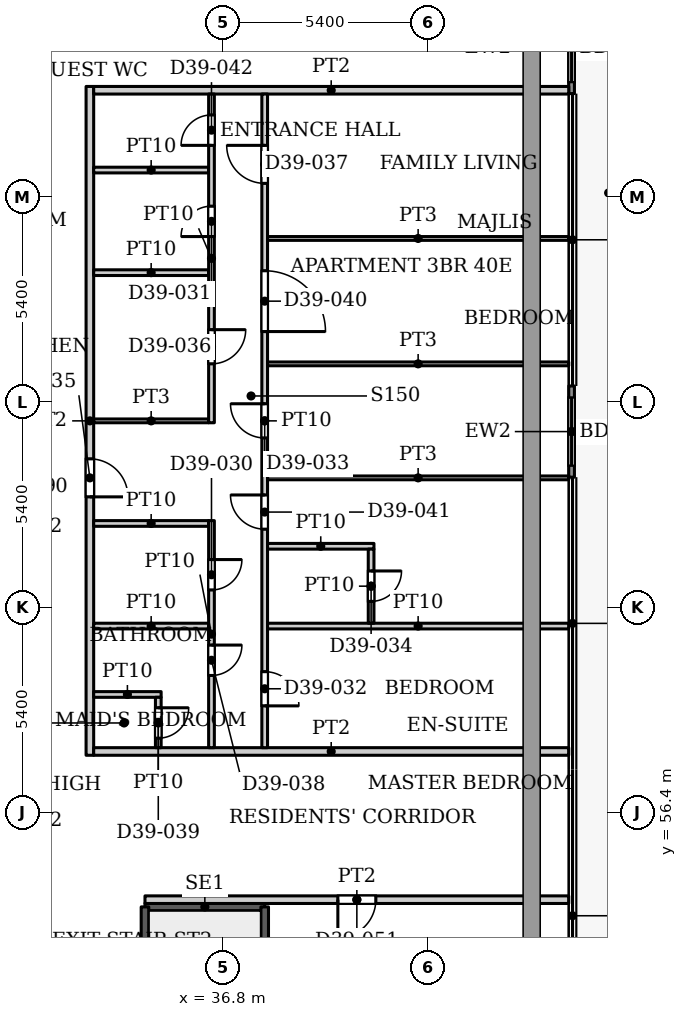
"""IFC4 building model, lengths in metres.
Left out: names, types, materials, properties, quantities, classifications, styles, units other than length and angle.
Written with IfcOpenShell. Run it as: python <this file> out.ifc"""

import sys

from ifc_helpers import new_model, si_unit, direction, frame, frame_2d, origin, place, context, subcontext, project, spatial, rectangle, extrude, source, transform, mapped, element, fill, save


model = new_model("IFC4")
c1 = context("Model", 3, precision=1e-05, world=origin(), true_north=direction((0.0, 1.0)))
c2 = subcontext(c1, "Body", "Model", "MODEL_VIEW")
j1 = project(units=[si_unit("LENGTHUNIT", "METRE"), si_unit("PLANEANGLEUNIT", "RADIAN")], contexts=[c1])
p1 = place(None, origin())
s1 = spatial("IfcSite", under=j1, at=p1, CompositionType="ELEMENT")
p2 = place(p1, origin())
s2 = spatial("IfcBuilding", under=s1, at=p2, CompositionType="ELEMENT")
p3 = place(p2, frame((0.0, 0.0, 172.1)))
s3 = spatial("IfcBuildingStorey", under=s2, at=p3, CompositionType="ELEMENT", Elevation=172.1)
p4 = place(p3, frame((45.975, 77.712, 0.0), z_axis=(0.0, 0.0, 1.0), x_axis=(0.0, -1.0, 0.0)))
e1 = element("IfcWall", 1, at=p4, inside=s3, PredefinedType="SOLIDWALL", context=c2, shape_type="SweptSolid", body=[
    extrude(rectangle(XDim=2.4, YDim=0.15, at=frame_2d((1.2, 0.0))), origin(), (0.0, 0.0, 1.0), 3.75),
])
p5 = place(p4, frame((0.3, 0.0, 0.0)))
e2 = element("IfcOpeningElement", 2, at=p5, cuts=e1, PredefinedType="OPENING", context=c2, shape_type="SweptSolid", body=[
    extrude(rectangle(XDim=1.8, YDim=2.4, at=frame_2d((0.9, 1.2))), frame((0.0, 0.085, 0.0), z_axis=(0.0, -1.0, 0.0), x_axis=(1.0, 0.0, 0.0)), (0.0, 0.0, 1.0), 0.17),
])
p6 = place(p3, frame((45.975, 67.618, 0.0), z_axis=(0.0, 0.0, 1.0), x_axis=(0.0, -1.0, 0.0)))
e3 = element("IfcWall", 3, at=p6, inside=s3, PredefinedType="SOLIDWALL", context=c2, shape_type="SweptSolid", body=[
    extrude(rectangle(XDim=2.4, YDim=0.15, at=frame_2d((1.2, 0.0))), origin(), (0.0, 0.0, 1.0), 3.75),
])
p7 = place(p6, frame((0.3, 0.0, 0.0)))
e4 = element("IfcOpeningElement", 4, at=p7, cuts=e3, PredefinedType="OPENING", context=c2, shape_type="SweptSolid", body=[
    extrude(rectangle(XDim=1.8, YDim=2.4, at=frame_2d((0.9, 1.2))), frame((0.0, 0.085, 0.0), z_axis=(0.0, -1.0, 0.0), x_axis=(1.0, 0.0, 0.0)), (0.0, 0.0, 1.0), 0.17),
])
p8 = place(p3, frame((34.75, 53.91, 0.0), z_axis=(0.0, 0.0, 1.0), x_axis=(1.0, 0.0, 0.0)))
e5 = element("IfcWall", 5, at=p8, inside=s3, PredefinedType="SHEAR", context=c2, shape_type="SweptSolid", body=[
    extrude(rectangle(XDim=3.15, YDim=0.2, at=frame_2d((1.575, 0.0))), origin(), (0.0, 0.0, 1.0), 3.9),
])
p9 = place(p3, frame((34.75, 47.5, 0.0), z_axis=(0.0, 0.0, 1.0), x_axis=(0.0, 1.0, 0.0)))
e6 = element("IfcWall", 6, at=p9, inside=s3, PredefinedType="SHEAR", context=c2, shape_type="SweptSolid", body=[
    extrude(rectangle(XDim=6.41, YDim=0.2, at=frame_2d((3.205, 0.0))), origin(), (0.0, 0.0, 1.0), 3.9),
])
p10 = place(p3, frame((37.9, 44.75, 0.0), z_axis=(0.0, 0.0, 1.0), x_axis=(0.0, 1.0, 0.0)))
e7 = element("IfcWall", 7, at=p10, inside=s3, PredefinedType="SHEAR", context=c2, shape_type="SweptSolid", body=[
    extrude(rectangle(XDim=9.16, YDim=0.2, at=frame_2d((4.58, 0.0))), origin(), (0.0, 0.0, 1.0), 3.9),
])
p11 = place(p3, frame((33.3, 57.9, 0.0), z_axis=(0.0, 0.0, 1.0), x_axis=(0.0, 1.0, 0.0)))
e8 = element("IfcWall", 8, at=p11, inside=s3, PredefinedType="PARTITIONING", context=c2, shape_type="SweptSolid", body=[
    extrude(rectangle(XDim=17.6, YDim=0.2, at=frame_2d((8.8, 0.0))), origin(), (0.0, 0.0, 1.0), 3.6),
])
p12 = place(p11, frame((6.8, 0.0, 0.0)))
e9 = element("IfcOpeningElement", 9, at=p12, cuts=e8, PredefinedType="OPENING", context=c2, shape_type="SweptSolid", body=[
    extrude(rectangle(XDim=1.0, YDim=2.1, at=frame_2d((0.5, 1.05))), frame((0.0, 0.11, 0.0), z_axis=(0.0, -1.0, 0.0), x_axis=(1.0, 0.0, 0.0)), (0.0, 0.0, 1.0), 0.22),
])
p13 = place(p3, frame((33.4, 58.0, 0.0), z_axis=(0.0, 0.0, 1.0), x_axis=(1.0, 0.0, 0.0)))
e10 = element("IfcWall", 10, at=p13, inside=s3, PredefinedType="PARTITIONING", context=c2, shape_type="SweptSolid", body=[
    extrude(rectangle(XDim=12.5, YDim=0.2, at=frame_2d((6.25, 0.0))), origin(), (0.0, 0.0, 1.0), 3.6),
])
p14 = place(p3, frame((33.4, 59.5, 0.0), z_axis=(0.0, 0.0, 1.0), x_axis=(1.0, 0.0, 0.0)))
e11 = element("IfcWall", 11, at=p14, inside=s3, PredefinedType="PARTITIONING", context=c2, shape_type="SweptSolid", body=[
    extrude(rectangle(XDim=1.775, YDim=0.15, at=frame_2d((0.888, 0.0))), origin(), (0.0, 0.0, 1.0), 3.6),
])
for number, where, z_axis, x_axis in (
    (12, (33.4, 61.3, 0.0), (0.0, 0.0, 1.0), (1.0, 0.0, 0.0)),
    (13, (33.4, 64.0, 0.0), (0.0, 0.0, 1.0), (1.0, 0.0, 0.0)),
):
    element("IfcWall", number, at=place(p3, frame(where, z_axis=z_axis, x_axis=x_axis)), inside=s3, PredefinedType="PARTITIONING", context=c2, shape_type="SweptSolid", body=[
        extrude(rectangle(XDim=3.025, YDim=0.15, at=frame_2d((1.513, 0.0))), origin(), (0.0, 0.0, 1.0), 3.6),
    ])
p15 = place(p3, frame((33.4, 66.7, 0.0), z_axis=(0.0, 0.0, 1.0), x_axis=(1.0, 0.0, 0.0)))
e14 = element("IfcWall", 14, at=p15, inside=s3, PredefinedType="PARTITIONING", context=c2, shape_type="SweptSolid", body=[
    extrude(rectangle(XDim=3.025, YDim=0.1, at=frame_2d((1.513, 0.0))), origin(), (0.0, 0.0, 1.0), 3.6),
])
for number, where, z_axis, x_axis in (
    (15, (33.4, 70.6, 0.0), (0.0, 0.0, 1.0), (1.0, 0.0, 0.0)),
    (16, (33.4, 73.3, 0.0), (0.0, 0.0, 1.0), (1.0, 0.0, 0.0)),
):
    element("IfcWall", number, at=place(p3, frame(where, z_axis=z_axis, x_axis=x_axis)), inside=s3, PredefinedType="PARTITIONING", context=c2, shape_type="SweptSolid", body=[
        extrude(rectangle(XDim=3.025, YDim=0.15, at=frame_2d((1.513, 0.0))), origin(), (0.0, 0.0, 1.0), 3.6),
    ])
p16 = place(p3, frame((33.4, 75.4, 0.0), z_axis=(0.0, 0.0, 1.0), x_axis=(1.0, 0.0, 0.0)))
e17 = element("IfcWall", 17, at=p16, inside=s3, PredefinedType="PARTITIONING", context=c2, shape_type="SweptSolid", body=[
    extrude(rectangle(XDim=12.5, YDim=0.2, at=frame_2d((6.25, 0.0))), origin(), (0.0, 0.0, 1.0), 3.6),
])
p17 = place(p3, frame((34.75, 54.1, 0.0), z_axis=(0.0, 0.0, 1.0), x_axis=(1.0, 0.0, 0.0)))
e18 = element("IfcWall", 18, at=p17, inside=s3, PredefinedType="PARTITIONING", context=c2, shape_type="SweptSolid", body=[
    extrude(rectangle(XDim=11.15, YDim=0.2, at=frame_2d((5.575, 0.0))), origin(), (0.0, 0.0, 1.0), 3.6),
])
p18 = place(p17, frame((5.075, 0.0, 0.0)))
e19 = element("IfcOpeningElement", 19, at=p18, cuts=e18, PredefinedType="OPENING", context=c2, shape_type="SweptSolid", body=[
    extrude(rectangle(XDim=1.0, YDim=2.1, at=frame_2d((0.5, 1.05))), frame((0.0, 0.11, 0.0), z_axis=(0.0, -1.0, 0.0), x_axis=(1.0, 0.0, 0.0)), (0.0, 0.0, 1.0), 0.22),
])
p19 = place(p3, frame((35.1, 58.1, 0.0), z_axis=(0.0, 0.0, 1.0), x_axis=(0.0, 1.0, 0.0)))
e20 = element("IfcWall", 20, at=p19, inside=s3, PredefinedType="PARTITIONING", context=c2, shape_type="SweptSolid", body=[
    extrude(rectangle(XDim=1.325, YDim=0.15, at=frame_2d((0.663, 0.0))), origin(), (0.0, 0.0, 1.0), 3.6),
])
p20 = place(p19, frame((0.25, 0.0, 0.0)))
e21 = element("IfcOpeningElement", 21, at=p20, cuts=e20, PredefinedType="OPENING", context=c2, shape_type="SweptSolid", body=[
    extrude(rectangle(XDim=0.8, YDim=2.1, at=frame_2d((0.4, 1.05))), frame((0.0, 0.085, 0.0), z_axis=(0.0, -1.0, 0.0), x_axis=(1.0, 0.0, 0.0)), (0.0, 0.0, 1.0), 0.17),
])
p21 = place(p3, frame((36.5, 58.1, 0.0), z_axis=(0.0, 0.0, 1.0), x_axis=(0.0, 1.0, 0.0)))
e22 = element("IfcWall", 22, at=p21, inside=s3, PredefinedType="PARTITIONING", context=c2, shape_type="SweptSolid", body=[
    extrude(rectangle(XDim=5.975, YDim=0.15, at=frame_2d((2.987, 0.0))), origin(), (0.0, 0.0, 1.0), 3.6),
])
p22 = place(p21, frame((4.15, 0.0, 0.0)))
e23 = element("IfcOpeningElement", 23, at=p22, cuts=e22, PredefinedType="OPENING", context=c2, shape_type="SweptSolid", body=[
    extrude(rectangle(XDim=0.8, YDim=2.1, at=frame_2d((0.4, 1.05))), frame((0.0, 0.085, 0.0), z_axis=(0.0, -1.0, 0.0), x_axis=(1.0, 0.0, 0.0)), (0.0, 0.0, 1.0), 0.17),
])
p23 = place(p21, frame((1.9, 0.0, 0.0)))
e24 = element("IfcOpeningElement", 24, at=p23, cuts=e22, PredefinedType="OPENING", context=c2, shape_type="SweptSolid", body=[
    extrude(rectangle(XDim=0.8, YDim=2.1, at=frame_2d((0.4, 1.05))), frame((0.0, 0.085, 0.0), z_axis=(0.0, -1.0, 0.0), x_axis=(1.0, 0.0, 0.0)), (0.0, 0.0, 1.0), 0.17),
])
p24 = place(p3, frame((36.5, 66.65, 0.0), z_axis=(0.0, 0.0, 1.0), x_axis=(0.0, 1.0, 0.0)))
e25 = element("IfcWall", 25, at=p24, inside=s3, PredefinedType="PARTITIONING", context=c2, shape_type="SweptSolid", body=[
    extrude(rectangle(XDim=8.65, YDim=0.15, at=frame_2d((4.325, 0.0))), origin(), (0.0, 0.0, 1.0), 3.6),
])
p25 = place(p24, frame((4.9, 0.0, 0.0)))
e26 = element("IfcOpeningElement", 26, at=p25, cuts=e25, PredefinedType="OPENING", context=c2, shape_type="SweptSolid", body=[
    extrude(rectangle(XDim=0.8, YDim=2.1, at=frame_2d((0.4, 1.05))), frame((0.0, 0.085, 0.0), z_axis=(0.0, -1.0, 0.0), x_axis=(1.0, 0.0, 0.0)), (0.0, 0.0, 1.0), 0.17),
])
p26 = place(p24, frame((1.55, 0.0, 0.0)))
e27 = element("IfcOpeningElement", 27, at=p26, cuts=e25, PredefinedType="OPENING", context=c2, shape_type="SweptSolid", body=[
    extrude(rectangle(XDim=0.9, YDim=2.1, at=frame_2d((0.45, 1.05))), frame((0.0, 0.085, 0.0), z_axis=(0.0, -1.0, 0.0), x_axis=(1.0, 0.0, 0.0)), (0.0, 0.0, 1.0), 0.17),
])
p27 = place(p24, frame((7.3, 0.0, 0.0)))
e28 = element("IfcOpeningElement", 28, at=p27, cuts=e25, PredefinedType="OPENING", context=c2, shape_type="SweptSolid", body=[
    extrude(rectangle(XDim=0.8, YDim=2.1, at=frame_2d((0.4, 1.05))), frame((0.0, 0.085, 0.0), z_axis=(0.0, -1.0, 0.0), x_axis=(1.0, 0.0, 0.0)), (0.0, 0.0, 1.0), 0.17),
])
p28 = place(p3, frame((37.9, 58.1, 0.0), z_axis=(0.0, 0.0, 1.0), x_axis=(0.0, 1.0, 0.0)))
e29 = element("IfcWall", 29, at=p28, inside=s3, PredefinedType="PARTITIONING", context=c2, shape_type="SweptSolid", body=[
    extrude(rectangle(XDim=17.2, YDim=0.15, at=frame_2d((8.6, 0.0))), origin(), (0.0, 0.0, 1.0), 3.6),
])
p29 = place(p28, frame((1.1, 0.0, 0.0)))
e30 = element("IfcOpeningElement", 30, at=p29, cuts=e29, PredefinedType="OPENING", context=c2, shape_type="SweptSolid", body=[
    extrude(rectangle(XDim=0.9, YDim=2.1, at=frame_2d((0.45, 1.05))), frame((0.0, 0.085, 0.0), z_axis=(0.0, -1.0, 0.0), x_axis=(1.0, 0.0, 0.0)), (0.0, 0.0, 1.0), 0.17),
])
p30 = place(p28, frame((8.15, 0.0, 0.0)))
e31 = element("IfcOpeningElement", 31, at=p30, cuts=e29, PredefinedType="OPENING", context=c2, shape_type="SweptSolid", body=[
    extrude(rectangle(XDim=0.9, YDim=2.1, at=frame_2d((0.45, 1.05))), frame((0.0, 0.085, 0.0), z_axis=(0.0, -1.0, 0.0), x_axis=(1.0, 0.0, 0.0)), (0.0, 0.0, 1.0), 0.17),
])
p31 = place(p28, frame((14.85, 0.0, 0.0)))
e32 = element("IfcOpeningElement", 32, at=p31, cuts=e29, PredefinedType="OPENING", context=c2, shape_type="SweptSolid", body=[
    extrude(rectangle(XDim=1.0, YDim=2.1, at=frame_2d((0.5, 1.05))), frame((0.0, 0.085, 0.0), z_axis=(0.0, -1.0, 0.0), x_axis=(1.0, 0.0, 0.0)), (0.0, 0.0, 1.0), 0.17),
])
p32 = place(p28, frame((10.95, 0.0, 0.0)))
e33 = element("IfcOpeningElement", 33, at=p32, cuts=e29, PredefinedType="OPENING", context=c2, shape_type="SweptSolid", body=[
    extrude(rectangle(XDim=1.6, YDim=2.1, at=frame_2d((0.8, 1.05))), frame((0.0, 0.085, 0.0), z_axis=(0.0, -1.0, 0.0), x_axis=(1.0, 0.0, 0.0)), (0.0, 0.0, 1.0), 0.17),
])
p33 = place(p28, frame((5.75, 0.0, 0.0)))
e34 = element("IfcOpeningElement", 34, at=p33, cuts=e29, PredefinedType="OPENING", context=c2, shape_type="SweptSolid", body=[
    extrude(rectangle(XDim=0.9, YDim=2.1, at=frame_2d((0.45, 1.05))), frame((0.0, 0.085, 0.0), z_axis=(0.0, -1.0, 0.0), x_axis=(1.0, 0.0, 0.0)), (0.0, 0.0, 1.0), 0.17),
])
p34 = place(p3, frame((37.975, 61.3, 0.0), z_axis=(0.0, 0.0, 1.0), x_axis=(1.0, 0.0, 0.0)))
e35 = element("IfcWall", 35, at=p34, inside=s3, PredefinedType="PARTITIONING", context=c2, shape_type="SweptSolid", body=[
    extrude(rectangle(XDim=7.925, YDim=0.15, at=frame_2d((3.962, 0.0))), origin(), (0.0, 0.0, 1.0), 3.6),
])
p35 = place(p3, frame((37.975, 63.4, 0.0), z_axis=(0.0, 0.0, 1.0), x_axis=(1.0, 0.0, 0.0)))
e36 = element("IfcWall", 36, at=p35, inside=s3, PredefinedType="PARTITIONING", context=c2, shape_type="SweptSolid", body=[
    extrude(rectangle(XDim=2.8, YDim=0.15, at=frame_2d((1.4, 0.0))), origin(), (0.0, 0.0, 1.0), 3.6),
])
for number, where, z_axis, x_axis in (
    (37, (37.975, 65.2, 0.0), (0.0, 0.0, 1.0), (1.0, 0.0, 0.0)),
    (38, (37.975, 68.2, 0.0), (0.0, 0.0, 1.0), (1.0, 0.0, 0.0)),
    (39, (37.975, 71.5, 0.0), (0.0, 0.0, 1.0), (1.0, 0.0, 0.0)),
):
    element("IfcWall", number, at=place(p3, frame(where, z_axis=z_axis, x_axis=x_axis)), inside=s3, PredefinedType="PARTITIONING", context=c2, shape_type="SweptSolid", body=[
        extrude(rectangle(XDim=7.925, YDim=0.1, at=frame_2d((3.962, 0.0))), origin(), (0.0, 0.0, 1.0), 3.6),
    ])
p36 = place(p3, frame((40.7, 61.375, 0.0), z_axis=(0.0, 0.0, 1.0), x_axis=(0.0, 1.0, 0.0)))
e40 = element("IfcWall", 40, at=p36, inside=s3, PredefinedType="PARTITIONING", context=c2, shape_type="SweptSolid", body=[
    extrude(rectangle(XDim=1.95, YDim=0.15, at=frame_2d((0.975, 0.0))), origin(), (0.0, 0.0, 1.0), 3.6),
])
p37 = place(p36, frame((0.575, 0.0, 0.0)))
e41 = element("IfcOpeningElement", 41, at=p37, cuts=e40, PredefinedType="OPENING", context=c2, shape_type="SweptSolid", body=[
    extrude(rectangle(XDim=0.8, YDim=2.1, at=frame_2d((0.4, 1.05))), frame((0.0, 0.085, 0.0), z_axis=(0.0, -1.0, 0.0), x_axis=(1.0, 0.0, 0.0)), (0.0, 0.0, 1.0), 0.17),
])
m1 = source(origin(), c2, "Body", "SweptSolid", [
    extrude(rectangle(XDim=1.8, YDim=2.4, at=frame_2d((0.9, 1.2))), frame((0.0, 0.025, 0.0), z_axis=(0.0, -1.0, 0.0), x_axis=(1.0, 0.0, 0.0)), (0.0, 0.0, 1.0), 0.05),
])
p38 = place(p5, origin())
e42 = element("IfcDoor", 42, at=p38, inside=s3, OperationType="SLIDING_TO_LEFT", PredefinedType="DOOR", context=c2, shape_type="MappedRepresentation", body=[
    mapped(m1, transform((0.0, 0.0, 0.0), x_axis=(1.0, 0.0, 0.0), y_axis=(0.0, 1.0, 0.0), z_axis=(0.0, 0.0, 1.0), scale=1.0)),
])
fill(e2, e42)
p39 = place(p7, origin())
e43 = element("IfcDoor", 43, at=p39, inside=s3, OperationType="SLIDING_TO_LEFT", PredefinedType="DOOR", context=c2, shape_type="MappedRepresentation", body=[
    mapped(m1, transform((0.0, 0.0, 0.0), x_axis=(1.0, 0.0, 0.0), y_axis=(0.0, 1.0, 0.0), z_axis=(0.0, 0.0, 1.0), scale=1.0)),
])
fill(e4, e43)
m2 = source(origin(), c2, "Body", "SweptSolid", [
    extrude(rectangle(XDim=0.8, YDim=2.1, at=frame_2d((0.4, 1.05))), frame((0.0, 0.025, 0.0), z_axis=(0.0, -1.0, 0.0), x_axis=(1.0, 0.0, 0.0)), (0.0, 0.0, 1.0), 0.05),
])
p40 = place(p22, origin())
e44 = element("IfcDoor", 44, at=p40, inside=s3, OperationType="SINGLE_SWING_RIGHT", PredefinedType="DOOR", context=c2, shape_type="MappedRepresentation", body=[
    mapped(m2, transform((0.0, 0.0, 0.0), x_axis=(1.0, 0.0, 0.0), y_axis=(0.0, 1.0, 0.0), z_axis=(0.0, 0.0, 1.0), scale=1.0)),
])
fill(e23, e44)
p41 = place(p25, origin())
e45 = element("IfcDoor", 45, at=p41, inside=s3, OperationType="SINGLE_SWING_LEFT", PredefinedType="DOOR", context=c2, shape_type="MappedRepresentation", body=[
    mapped(m2, transform((0.0, 0.0, 0.0), x_axis=(1.0, 0.0, 0.0), y_axis=(0.0, 1.0, 0.0), z_axis=(0.0, 0.0, 1.0), scale=1.0)),
])
fill(e26, e45)
m3 = source(origin(), c2, "Body", "SweptSolid", [
    extrude(rectangle(XDim=0.9, YDim=2.1, at=frame_2d((0.45, 1.05))), frame((0.0, 0.025, 0.0), z_axis=(0.0, -1.0, 0.0), x_axis=(1.0, 0.0, 0.0)), (0.0, 0.0, 1.0), 0.05),
])
p42 = place(p29, origin())
e46 = element("IfcDoor", 46, at=p42, inside=s3, OperationType="SINGLE_SWING_RIGHT", PredefinedType="DOOR", context=c2, shape_type="MappedRepresentation", body=[
    mapped(m3, transform((0.0, 0.0, 0.0), x_axis=(1.0, 0.0, 0.0), y_axis=(0.0, 1.0, 0.0), z_axis=(0.0, 0.0, 1.0), scale=1.0)),
])
fill(e30, e46)
p43 = place(p30, origin())
e47 = element("IfcDoor", 47, at=p43, inside=s3, OperationType="SINGLE_SWING_LEFT", PredefinedType="DOOR", context=c2, shape_type="MappedRepresentation", body=[
    mapped(m3, transform((0.0, 0.0, 0.0), x_axis=(1.0, 0.0, 0.0), y_axis=(0.0, 1.0, 0.0), z_axis=(0.0, 0.0, 1.0), scale=1.0)),
])
fill(e31, e47)
p44 = place(p37, origin())
e48 = element("IfcDoor", 48, at=p44, inside=s3, OperationType="SINGLE_SWING_RIGHT", PredefinedType="DOOR", context=c2, shape_type="MappedRepresentation", body=[
    mapped(m2, transform((0.0, 0.0, 0.0), x_axis=(1.0, 0.0, 0.0), y_axis=(0.0, 1.0, 0.0), z_axis=(0.0, 0.0, 1.0), scale=1.0)),
])
fill(e41, e48)
m4 = source(origin(), c2, "Body", "SweptSolid", [
    extrude(rectangle(XDim=1.0, YDim=2.1, at=frame_2d((0.5, 1.05))), frame((0.0, 0.025, 0.0), z_axis=(0.0, -1.0, 0.0), x_axis=(1.0, 0.0, 0.0)), (0.0, 0.0, 1.0), 0.05),
])
p45 = place(p12, origin())
e49 = element("IfcDoor", 49, at=p45, inside=s3, OperationType="SINGLE_SWING_RIGHT", PredefinedType="DOOR", context=c2, shape_type="MappedRepresentation", body=[
    mapped(m4, transform((0.0, 0.0, 0.0), x_axis=(1.0, 0.0, 0.0), y_axis=(0.0, 1.0, 0.0), z_axis=(0.0, 0.0, 1.0), scale=1.0)),
])
fill(e9, e49)
p46 = place(p26, origin())
e50 = element("IfcDoor", 50, at=p46, inside=s3, OperationType="SINGLE_SWING_RIGHT", PredefinedType="DOOR", context=c2, shape_type="MappedRepresentation", body=[
    mapped(m3, transform((0.0, 0.0, 0.0), x_axis=(1.0, 0.0, 0.0), y_axis=(0.0, 1.0, 0.0), z_axis=(0.0, 0.0, 1.0), scale=1.0)),
])
fill(e27, e50)
m5 = source(origin(), c2, "Body", "SweptSolid", [
    extrude(rectangle(XDim=1.0, YDim=2.1, at=frame_2d((0.5, 1.05))), frame((0.0, 0.025, 0.0), z_axis=(0.0, -1.0, 0.0), x_axis=(1.0, 0.0, 0.0)), (0.0, 0.0, 1.0), 0.05),
])
p47 = place(p31, origin())
e51 = element("IfcDoor", 51, at=p47, inside=s3, OperationType="SINGLE_SWING_LEFT", PredefinedType="DOOR", context=c2, shape_type="MappedRepresentation", body=[
    mapped(m5, transform((0.0, 0.0, 0.0), x_axis=(1.0, 0.0, 0.0), y_axis=(0.0, 1.0, 0.0), z_axis=(0.0, 0.0, 1.0), scale=1.0)),
])
fill(e32, e51)
p48 = place(p23, origin())
e52 = element("IfcDoor", 52, at=p48, inside=s3, OperationType="SINGLE_SWING_RIGHT", PredefinedType="DOOR", context=c2, shape_type="MappedRepresentation", body=[
    mapped(m2, transform((0.0, 0.0, 0.0), x_axis=(1.0, 0.0, 0.0), y_axis=(0.0, 1.0, 0.0), z_axis=(0.0, 0.0, 1.0), scale=1.0)),
])
fill(e24, e52)
p49 = place(p20, origin())
e53 = element("IfcDoor", 53, at=p49, inside=s3, OperationType="SINGLE_SWING_RIGHT", PredefinedType="DOOR", context=c2, shape_type="MappedRepresentation", body=[
    mapped(m2, transform((0.0, 0.0, 0.0), x_axis=(1.0, 0.0, 0.0), y_axis=(0.0, 1.0, 0.0), z_axis=(0.0, 0.0, 1.0), scale=1.0)),
])
fill(e21, e53)
m6 = source(origin(), c2, "Body", "SweptSolid", [
    extrude(rectangle(XDim=1.6, YDim=2.1, at=frame_2d((0.8, 1.05))), frame((0.0, 0.025, 0.0), z_axis=(0.0, -1.0, 0.0), x_axis=(1.0, 0.0, 0.0)), (0.0, 0.0, 1.0), 0.05),
])
p50 = place(p32, origin())
e54 = element("IfcDoor", 54, at=p50, inside=s3, OperationType="DOUBLE_DOOR_SINGLE_SWING", PredefinedType="DOOR", context=c2, shape_type="MappedRepresentation", body=[
    mapped(m6, transform((0.0, 0.0, 0.0), x_axis=(1.0, 0.0, 0.0), y_axis=(0.0, 1.0, 0.0), z_axis=(0.0, 0.0, 1.0), scale=1.0)),
])
fill(e33, e54)
p51 = place(p33, origin())
e55 = element("IfcDoor", 55, at=p51, inside=s3, OperationType="SINGLE_SWING_LEFT", PredefinedType="DOOR", context=c2, shape_type="MappedRepresentation", body=[
    mapped(m3, transform((0.0, 0.0, 0.0), x_axis=(1.0, 0.0, 0.0), y_axis=(0.0, 1.0, 0.0), z_axis=(0.0, 0.0, 1.0), scale=1.0)),
])
fill(e34, e55)
p52 = place(p27, origin())
e56 = element("IfcDoor", 56, at=p52, inside=s3, OperationType="SINGLE_SWING_LEFT", PredefinedType="DOOR", context=c2, shape_type="MappedRepresentation", body=[
    mapped(m2, transform((0.0, 0.0, 0.0), x_axis=(1.0, 0.0, 0.0), y_axis=(0.0, 1.0, 0.0), z_axis=(0.0, 0.0, 1.0), scale=1.0)),
])
fill(e28, e56)
m7 = source(origin(), c2, "Body", "SweptSolid", [
    extrude(rectangle(XDim=1.0, YDim=2.1, at=frame_2d((0.5, 1.05))), frame((0.0, 0.025, 0.0), z_axis=(0.0, -1.0, 0.0), x_axis=(1.0, 0.0, 0.0)), (0.0, 0.0, 1.0), 0.05),
])
p53 = place(p18, origin())
e57 = element("IfcDoor", 57, at=p53, inside=s3, OperationType="SINGLE_SWING_RIGHT", PredefinedType="DOOR", context=c2, shape_type="MappedRepresentation", body=[
    mapped(m7, transform((0.0, 0.0, 0.0), x_axis=(1.0, 0.0, 0.0), y_axis=(0.0, 1.0, 0.0), z_axis=(0.0, 0.0, 1.0), scale=1.0)),
])
fill(e19, e57)
save(model, sys.argv[1])
